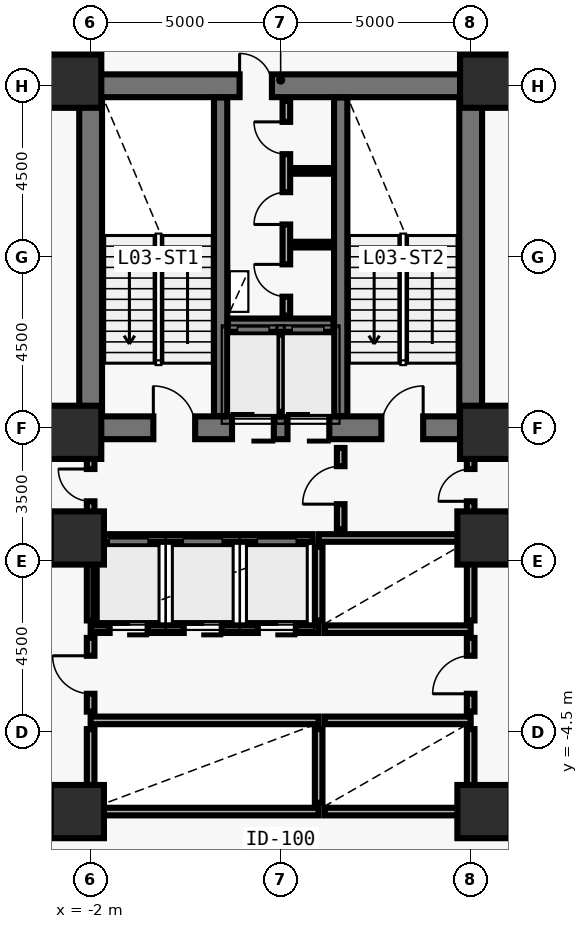
"""IFC4 building model, lengths in metres.
Left out: names, types, materials, properties, quantities, classifications, styles, units other than length and angle.
Written with IfcOpenShell. Run it as: python <this file> out.ifc"""

import sys

from ifc_helpers import new_model, si_unit, direction, frame, frame_2d, origin, origin_2d, place, context, subcontext, project, spatial, rectangle, extrude, element, fill, save


model = new_model("IFC4")
c1 = context("Model", 3, precision=1e-05, world=origin(), true_north=direction((0.0, 1.0)))
c2 = subcontext(c1, "Body", "Model", "MODEL_VIEW")
j1 = project(units=[si_unit("LENGTHUNIT", "METRE"), si_unit("PLANEANGLEUNIT", "RADIAN")], contexts=[c1])
p1 = place(None, origin())
s1 = spatial("IfcSite", under=j1, at=p1, CompositionType="ELEMENT")
p2 = place(p1, origin())
s2 = spatial("IfcBuilding", under=s1, at=p2, CompositionType="ELEMENT")
p3 = place(p2, frame((0.0, 0.0, 13.8)))
s3 = spatial("IfcBuildingStorey", under=s2, at=p3, CompositionType="ELEMENT", Elevation=13.8)
p4 = place(p3, frame((-2.0, 3.5, 0.0), z_axis=(0.0, 0.0, 1.0), x_axis=(1.0, 0.0, 0.0)))
e1 = element("IfcWall", 1, at=p4, inside=s3, PredefinedType="SHEAR", context=c2, shape_type="SweptSolid", body=[
    extrude(rectangle(XDim=10.0, YDim=0.6, at=frame_2d((5.0, 0.0))), origin(), (0.0, 0.0, 1.0), 4.592),
])
p5 = place(p4, frame((1.65, 0.0, 0.0)))
e2 = element("IfcOpeningElement", 2, at=p5, cuts=e1, PredefinedType="OPENING", context=c2, shape_type="SweptSolid", body=[
    extrude(rectangle(XDim=1.1, YDim=2.15, at=frame_2d((0.55, 1.075))), frame((0.0, 0.31, 0.0), z_axis=(0.0, -1.0, 0.0), x_axis=(1.0, 0.0, 0.0)), (0.0, 0.0, 1.0), 0.62),
])
p6 = place(p4, frame((7.65, 0.0, 0.0)))
e3 = element("IfcOpeningElement", 3, at=p6, cuts=e1, PredefinedType="OPENING", context=c2, shape_type="SweptSolid", body=[
    extrude(rectangle(XDim=1.1, YDim=2.15, at=frame_2d((0.55, 1.075))), frame((0.0, 0.31, 0.0), z_axis=(0.0, -1.0, 0.0), x_axis=(1.0, 0.0, 0.0)), (0.0, 0.0, 1.0), 0.62),
])
p7 = place(p4, frame((3.72, 0.0, 0.0)))
e4 = element("IfcOpeningElement", 4, at=p7, cuts=e1, PredefinedType="OPENING", context=c2, shape_type="SweptSolid", body=[
    extrude(rectangle(XDim=1.1, YDim=2.2, at=frame_2d((0.55, 1.1))), frame((0.0, 0.31, 0.0), z_axis=(0.0, -1.0, 0.0), x_axis=(1.0, 0.0, 0.0)), (0.0, 0.0, 1.0), 0.62),
])
p8 = place(p4, frame((5.18, 0.0, 0.0)))
e5 = element("IfcOpeningElement", 5, at=p8, cuts=e1, PredefinedType="OPENING", context=c2, shape_type="SweptSolid", body=[
    extrude(rectangle(XDim=1.1, YDim=2.2, at=frame_2d((0.55, 1.1))), frame((0.0, 0.31, 0.0), z_axis=(0.0, -1.0, 0.0), x_axis=(1.0, 0.0, 0.0)), (0.0, 0.0, 1.0), 0.62),
])
p9 = place(p3, frame((-2.0, 12.5, 0.0), z_axis=(0.0, 0.0, 1.0), x_axis=(1.0, 0.0, 0.0)))
e6 = element("IfcWall", 6, at=p9, inside=s3, PredefinedType="SHEAR", context=c2, shape_type="SweptSolid", body=[
    extrude(rectangle(XDim=10.0, YDim=0.6, at=frame_2d((5.0, 0.0))), origin(), (0.0, 0.0, 1.0), 4.592),
])
p10 = place(p9, frame((3.92, 0.0, 0.0)))
e7 = element("IfcOpeningElement", 7, at=p10, cuts=e6, PredefinedType="OPENING", context=c2, shape_type="SweptSolid", body=[
    extrude(rectangle(XDim=0.85, YDim=2.1, at=frame_2d((0.425, 1.05))), frame((0.0, 0.31, 0.0), z_axis=(0.0, -1.0, 0.0), x_axis=(1.0, 0.0, 0.0)), (0.0, 0.0, 1.0), 0.62),
])
for number, where, z_axis, x_axis in (
    (8, (-2.0, 3.81, 0.0), (0.0, 0.0, 1.0), (0.0, 1.0, 0.0)),
    (9, (8.0, 3.81, 0.0), (0.0, 0.0, 1.0), (0.0, 1.0, 0.0)),
):
    element("IfcWall", number, at=place(p3, frame(where, z_axis=z_axis, x_axis=x_axis)), inside=s3, PredefinedType="SHEAR", context=c2, shape_type="SweptSolid", body=[
        extrude(rectangle(XDim=8.38, YDim=0.6, at=frame_2d((4.19, 0.0))), origin(), (0.0, 0.0, 1.0), 4.592),
    ])
for number, where, z_axis, x_axis in (
    (10, (1.42, 3.81, 0.0), (0.0, 0.0, 1.0), (0.0, 1.0, 0.0)),
    (11, (4.58, 3.81, 0.0), (0.0, 0.0, 1.0), (0.0, 1.0, 0.0)),
):
    element("IfcWall", number, at=place(p3, frame(where, z_axis=z_axis, x_axis=x_axis)), inside=s3, PredefinedType="SHEAR", context=c2, shape_type="SweptSolid", body=[
        extrude(rectangle(XDim=8.38, YDim=0.35, at=frame_2d((4.19, 0.0))), origin(), (0.0, 0.0, 1.0), 4.592),
    ])
p11 = place(p3, frame((1.61, 6.2, 0.0), z_axis=(0.0, 0.0, 1.0), x_axis=(1.0, 0.0, 0.0)))
e12 = element("IfcWall", 12, at=p11, inside=s3, PredefinedType="SHEAR", context=c2, shape_type="SweptSolid", body=[
    extrude(rectangle(XDim=2.78, YDim=0.35, at=frame_2d((1.39, 0.0))), origin(), (0.0, 0.0, 1.0), 4.592),
])
for number, where, z_axis, x_axis in (
    (13, (-2.42, 12.62, 0.0), (0.0, 0.0, 1.0), (1.0, 0.0, 0.0)),
    (14, (8.42, 12.62, 0.0), (0.0, 0.0, 1.0), (1.0, 0.0, 0.0)),
    (15, (-2.42, 3.38, 0.0), (0.0, 0.0, 1.0), (1.0, 0.0, 0.0)),
    (16, (8.42, 3.38, 0.0), (0.0, 0.0, 1.0), (1.0, 0.0, 0.0)),
    (17, (-2.35, 0.6, 0.0), (0.0, 0.0, 1.0), (1.0, 0.0, 0.0)),
    (18, (8.35, 0.6, 0.0), (0.0, 0.0, 1.0), (1.0, 0.0, 0.0)),
    (19, (-2.35, -6.6, 0.0), (0.0, 0.0, 1.0), (1.0, 0.0, 0.0)),
    (20, (8.35, -6.6, 0.0), (0.0, 0.0, 1.0), (1.0, 0.0, 0.0)),
):
    element("IfcColumn", number, at=place(p3, frame(where, z_axis=z_axis, x_axis=x_axis)), inside=s3, PredefinedType="COLUMN", context=c2, shape_type="SweptSolid", body=[
        extrude(rectangle(XDim=1.4, YDim=1.4, at=origin_2d()), origin(), (0.0, 0.0, 1.0), 4.575),
    ])
p12 = place(p3, frame((3.0, 3.92, 0.0), z_axis=(0.0, 0.0, 1.0), x_axis=(0.0, 1.0, 0.0)))
e21 = element("IfcWall", 21, at=p12, inside=s3, PredefinedType="SOLIDWALL", context=c2, shape_type="SweptSolid", body=[
    extrude(rectangle(XDim=2.03, YDim=0.2, at=frame_2d((1.015, 0.0))), origin(), (0.0, 0.0, 1.0), 4.28),
])
p13 = place(p3, frame((4.0, 0.6, 0.0), z_axis=(0.0, 0.0, 1.0), x_axis=(1.0, 0.0, 0.0)))
e22 = element("IfcWall", 22, at=p13, inside=s3, PredefinedType="SOLIDWALL", context=c2, shape_type="SweptSolid", body=[
    extrude(rectangle(XDim=3.88, YDim=0.2, at=frame_2d((1.94, 0.0))), origin(), (0.0, 0.0, 1.0), 3.362),
])
p14 = place(p3, frame((-2.0, -1.8, 0.0), z_axis=(0.0, 0.0, 1.0), x_axis=(1.0, 0.0, 0.0)))
e23 = element("IfcWall", 23, at=p14, inside=s3, PredefinedType="SOLIDWALL", context=c2, shape_type="SweptSolid", body=[
    extrude(rectangle(XDim=6.0, YDim=0.2, at=frame_2d((3.0, 0.0))), origin(), (0.0, 0.0, 1.0), 4.28),
])
p15 = place(p14, frame((0.5, 0.0, 0.0)))
e24 = element("IfcOpeningElement", 24, at=p15, cuts=e23, PredefinedType="OPENING", context=c2, shape_type="SweptSolid", body=[
    extrude(rectangle(XDim=1.0, YDim=2.2, at=frame_2d((0.5, 1.1))), frame((0.0, 0.11, 0.0), z_axis=(0.0, -1.0, 0.0), x_axis=(1.0, 0.0, 0.0)), (0.0, 0.0, 1.0), 0.22),
])
p16 = place(p14, frame((2.45, 0.0, 0.0)))
e25 = element("IfcOpeningElement", 25, at=p16, cuts=e23, PredefinedType="OPENING", context=c2, shape_type="SweptSolid", body=[
    extrude(rectangle(XDim=1.0, YDim=2.2, at=frame_2d((0.5, 1.1))), frame((0.0, 0.11, 0.0), z_axis=(0.0, -1.0, 0.0), x_axis=(1.0, 0.0, 0.0)), (0.0, 0.0, 1.0), 0.22),
])
p17 = place(p14, frame((4.4, 0.0, 0.0)))
e26 = element("IfcOpeningElement", 26, at=p17, cuts=e23, PredefinedType="OPENING", context=c2, shape_type="SweptSolid", body=[
    extrude(rectangle(XDim=1.0, YDim=2.2, at=frame_2d((0.5, 1.1))), frame((0.0, 0.11, 0.0), z_axis=(0.0, -1.0, 0.0), x_axis=(1.0, 0.0, 0.0)), (0.0, 0.0, 1.0), 0.22),
])
p18 = place(p3, frame((-2.0, -1.57, 0.0), z_axis=(0.0, 0.0, 1.0), x_axis=(0.0, 1.0, 0.0)))
e27 = element("IfcWall", 27, at=p18, inside=s3, PredefinedType="SOLIDWALL", context=c2, shape_type="SweptSolid", body=[
    extrude(rectangle(XDim=2.05, YDim=0.2, at=frame_2d((1.025, 0.0))), origin(), (0.0, 0.0, 1.0), 3.362),
])
p19 = place(p3, frame((4.16, -1.8, 0.0), z_axis=(0.0, 0.0, 1.0), x_axis=(1.0, 0.0, 0.0)))
e28 = element("IfcWall", 28, at=p19, inside=s3, PredefinedType="SOLIDWALL", context=c2, shape_type="SweptSolid", body=[
    extrude(rectangle(XDim=3.84, YDim=0.2, at=frame_2d((1.92, 0.0))), origin(), (0.0, 0.0, 1.0), 4.28),
])
p20 = place(p3, frame((4.0, -1.57, 0.0), z_axis=(0.0, 0.0, 1.0), x_axis=(0.0, 1.0, 0.0)))
e29 = element("IfcWall", 29, at=p20, inside=s3, PredefinedType="SOLIDWALL", context=c2, shape_type="SweptSolid", body=[
    extrude(rectangle(XDim=1.94, YDim=0.2, at=frame_2d((0.97, 0.0))), origin(), (0.0, 0.0, 1.0), 4.28),
])
p21 = place(p3, frame((8.0, -1.57, 0.0), z_axis=(0.0, 0.0, 1.0), x_axis=(0.0, 1.0, 0.0)))
e30 = element("IfcWall", 30, at=p21, inside=s3, PredefinedType="SOLIDWALL", context=c2, shape_type="SweptSolid", body=[
    extrude(rectangle(XDim=2.05, YDim=0.2, at=frame_2d((1.025, 0.0))), origin(), (0.0, 0.0, 1.0), 3.362),
])
p22 = place(p3, frame((-2.0, -4.2, 0.0), z_axis=(0.0, 0.0, 1.0), x_axis=(1.0, 0.0, 0.0)))
e31 = element("IfcWall", 31, at=p22, inside=s3, PredefinedType="SOLIDWALL", context=c2, shape_type="SweptSolid", body=[
    extrude(rectangle(XDim=6.0, YDim=0.2, at=frame_2d((3.0, 0.0))), origin(), (0.0, 0.0, 1.0), 4.28),
])
p23 = place(p3, frame((-2.0, -6.6, 0.0), z_axis=(0.0, 0.0, 1.0), x_axis=(1.0, 0.0, 0.0)))
e32 = element("IfcWall", 32, at=p23, inside=s3, PredefinedType="SOLIDWALL", context=c2, shape_type="SweptSolid", body=[
    extrude(rectangle(XDim=6.0, YDim=0.2, at=frame_2d((3.0, 0.0))), origin(), (0.0, 0.0, 1.0), 3.362),
])
p24 = place(p3, frame((-2.0, -6.37, 0.0), z_axis=(0.0, 0.0, 1.0), x_axis=(0.0, 1.0, 0.0)))
e33 = element("IfcWall", 33, at=p24, inside=s3, PredefinedType="SOLIDWALL", context=c2, shape_type="SweptSolid", body=[
    extrude(rectangle(XDim=1.94, YDim=0.2, at=frame_2d((0.97, 0.0))), origin(), (0.0, 0.0, 1.0), 3.362),
])
p25 = place(p3, frame((4.16, -4.2, 0.0), z_axis=(0.0, 0.0, 1.0), x_axis=(1.0, 0.0, 0.0)))
e34 = element("IfcWall", 34, at=p25, inside=s3, PredefinedType="SOLIDWALL", context=c2, shape_type="SweptSolid", body=[
    extrude(rectangle(XDim=3.84, YDim=0.2, at=frame_2d((1.92, 0.0))), origin(), (0.0, 0.0, 1.0), 4.28),
])
p26 = place(p3, frame((4.16, -6.6, 0.0), z_axis=(0.0, 0.0, 1.0), x_axis=(1.0, 0.0, 0.0)))
e35 = element("IfcWall", 35, at=p26, inside=s3, PredefinedType="SOLIDWALL", context=c2, shape_type="SweptSolid", body=[
    extrude(rectangle(XDim=3.84, YDim=0.2, at=frame_2d((1.92, 0.0))), origin(), (0.0, 0.0, 1.0), 3.362),
])
p27 = place(p3, frame((4.0, -6.37, 0.0), z_axis=(0.0, 0.0, 1.0), x_axis=(0.0, 1.0, 0.0)))
e36 = element("IfcWall", 36, at=p27, inside=s3, PredefinedType="SOLIDWALL", context=c2, shape_type="SweptSolid", body=[
    extrude(rectangle(XDim=1.94, YDim=0.2, at=frame_2d((0.97, 0.0))), origin(), (0.0, 0.0, 1.0), 4.28),
])
p28 = place(p3, frame((8.0, -6.37, 0.0), z_axis=(0.0, 0.0, 1.0), x_axis=(0.0, 1.0, 0.0)))
e37 = element("IfcWall", 37, at=p28, inside=s3, PredefinedType="SOLIDWALL", context=c2, shape_type="SweptSolid", body=[
    extrude(rectangle(XDim=1.94, YDim=0.2, at=frame_2d((0.97, 0.0))), origin(), (0.0, 0.0, 1.0), 3.362),
])
p29 = place(p3, frame((3.15, 6.45, 0.0), z_axis=(0.0, 0.0, 1.0), x_axis=(0.0, 1.0, 0.0)))
e38 = element("IfcWall", 38, at=p29, inside=s3, PredefinedType="MOVABLE", context=c2, shape_type="SweptSolid", body=[
    extrude(rectangle(XDim=5.65, YDim=0.2, at=frame_2d((2.825, 0.0))), origin(), (0.0, 0.0, 1.0), 4.28),
])
p30 = place(p29, frame((0.5, 0.0, 0.0)))
e39 = element("IfcOpeningElement", 39, at=p30, cuts=e38, PredefinedType="OPENING", context=c2, shape_type="SweptSolid", body=[
    extrude(rectangle(XDim=0.85, YDim=2.1, at=frame_2d((0.425, 1.05))), frame((0.0, 0.11, 0.0), z_axis=(0.0, -1.0, 0.0), x_axis=(1.0, 0.0, 0.0)), (0.0, 0.0, 1.0), 0.22),
])
p31 = place(p29, frame((2.4, 0.0, 0.0)))
e40 = element("IfcOpeningElement", 40, at=p31, cuts=e38, PredefinedType="OPENING", context=c2, shape_type="SweptSolid", body=[
    extrude(rectangle(XDim=0.85, YDim=2.1, at=frame_2d((0.425, 1.05))), frame((0.0, 0.11, 0.0), z_axis=(0.0, -1.0, 0.0), x_axis=(1.0, 0.0, 0.0)), (0.0, 0.0, 1.0), 0.22),
])
p32 = place(p29, frame((4.25, 0.0, 0.0)))
e41 = element("IfcOpeningElement", 41, at=p32, cuts=e38, PredefinedType="OPENING", context=c2, shape_type="SweptSolid", body=[
    extrude(rectangle(XDim=0.85, YDim=2.1, at=frame_2d((0.425, 1.05))), frame((0.0, 0.11, 0.0), z_axis=(0.0, -1.0, 0.0), x_axis=(1.0, 0.0, 0.0)), (0.0, 0.0, 1.0), 0.22),
])
p33 = place(p3, frame((4.58, 0.83, 0.0), z_axis=(0.0, 0.0, 1.0), x_axis=(0.0, 1.0, 0.0)))
e42 = element("IfcWall", 42, at=p33, inside=s3, PredefinedType="MOVABLE", context=c2, shape_type="SweptSolid", body=[
    extrude(rectangle(XDim=2.14, YDim=0.2, at=frame_2d((1.07, 0.0))), origin(), (0.0, 0.0, 1.0), 4.28),
])
p34 = place(p33, frame((0.66, 0.0, 0.0)))
e43 = element("IfcOpeningElement", 43, at=p34, cuts=e42, PredefinedType="OPENING", context=c2, shape_type="SweptSolid", body=[
    extrude(rectangle(XDim=1.0, YDim=2.1, at=frame_2d((0.5, 1.05))), frame((0.0, 0.11, 0.0), z_axis=(0.0, -1.0, 0.0), x_axis=(1.0, 0.0, 0.0)), (0.0, 0.0, 1.0), 0.22),
])
p35 = place(p3, frame((-2.0, 0.72, 0.0), z_axis=(0.0, 0.0, 1.0), x_axis=(0.0, 1.0, 0.0)))
e44 = element("IfcWall", 44, at=p35, inside=s3, PredefinedType="MOVABLE", context=c2, shape_type="SweptSolid", body=[
    extrude(rectangle(XDim=2.25, YDim=0.2, at=frame_2d((1.125, 0.0))), origin(), (0.0, 0.0, 1.0), 3.512),
])
p36 = place(p35, frame((0.845, 0.0, 0.0)))
e45 = element("IfcOpeningElement", 45, at=p36, cuts=e44, PredefinedType="OPENING", context=c2, shape_type="SweptSolid", body=[
    extrude(rectangle(XDim=0.85, YDim=2.1, at=frame_2d((0.425, 1.05))), frame((0.0, 0.11, 0.0), z_axis=(0.0, -1.0, 0.0), x_axis=(1.0, 0.0, 0.0)), (0.0, 0.0, 1.0), 0.22),
])
p37 = place(p3, frame((8.0, 0.72, 0.0), z_axis=(0.0, 0.0, 1.0), x_axis=(0.0, 1.0, 0.0)))
e46 = element("IfcWall", 46, at=p37, inside=s3, PredefinedType="MOVABLE", context=c2, shape_type="SweptSolid", body=[
    extrude(rectangle(XDim=2.25, YDim=0.2, at=frame_2d((1.125, 0.0))), origin(), (0.0, 0.0, 1.0), 3.512),
])
p38 = place(p37, frame((0.845, 0.0, 0.0)))
e47 = element("IfcOpeningElement", 47, at=p38, cuts=e46, PredefinedType="OPENING", context=c2, shape_type="SweptSolid", body=[
    extrude(rectangle(XDim=0.85, YDim=2.1, at=frame_2d((0.425, 1.05))), frame((0.0, 0.11, 0.0), z_axis=(0.0, -1.0, 0.0), x_axis=(1.0, 0.0, 0.0)), (0.0, 0.0, 1.0), 0.22),
])
p39 = place(p3, frame((-2.0, -3.97, 0.0), z_axis=(0.0, 0.0, 1.0), x_axis=(0.0, 1.0, 0.0)))
e48 = element("IfcWall", 48, at=p39, inside=s3, PredefinedType="MOVABLE", context=c2, shape_type="SweptSolid", body=[
    extrude(rectangle(XDim=1.94, YDim=0.2, at=frame_2d((0.97, 0.0))), origin(), (0.0, 0.0, 1.0), 3.362),
])
p40 = place(p39, frame((0.47, 0.0, 0.0)))
e49 = element("IfcOpeningElement", 49, at=p40, cuts=e48, PredefinedType="OPENING", context=c2, shape_type="SweptSolid", body=[
    extrude(rectangle(XDim=1.0, YDim=2.1, at=frame_2d((0.5, 1.05))), frame((0.0, 0.11, 0.0), z_axis=(0.0, -1.0, 0.0), x_axis=(1.0, 0.0, 0.0)), (0.0, 0.0, 1.0), 0.22),
])
p41 = place(p3, frame((8.0, -3.97, 0.0), z_axis=(0.0, 0.0, 1.0), x_axis=(0.0, 1.0, 0.0)))
e50 = element("IfcWall", 50, at=p41, inside=s3, PredefinedType="MOVABLE", context=c2, shape_type="SweptSolid", body=[
    extrude(rectangle(XDim=1.94, YDim=0.2, at=frame_2d((0.97, 0.0))), origin(), (0.0, 0.0, 1.0), 3.362),
])
p42 = place(p41, frame((0.47, 0.0, 0.0)))
e51 = element("IfcOpeningElement", 51, at=p42, cuts=e50, PredefinedType="OPENING", context=c2, shape_type="SweptSolid", body=[
    extrude(rectangle(XDim=1.0, YDim=2.1, at=frame_2d((0.5, 1.05))), frame((0.0, 0.11, 0.0), z_axis=(0.0, -1.0, 0.0), x_axis=(1.0, 0.0, 0.0)), (0.0, 0.0, 1.0), 0.22),
])
for number, where, z_axis, x_axis in (
    (52, (3.37, 8.32, 0.0), (0.0, 0.0, 1.0), (1.0, 0.0, 0.0)),
    (53, (3.37, 10.26, 0.0), (0.0, 0.0, 1.0), (1.0, 0.0, 0.0)),
):
    element("IfcWall", number, at=place(p3, frame(where, z_axis=z_axis, x_axis=x_axis)), inside=s3, PredefinedType="PARTITIONING", context=c2, shape_type="SweptSolid", body=[
        extrude(rectangle(XDim=0.98, YDim=0.15, at=frame_2d((0.49, 0.0))), origin(), (0.0, 0.0, 1.0), 4.28),
    ])
p43 = place(p3, frame((-1.88, 0.6, 0.0), z_axis=(0.0, 0.0, 1.0), x_axis=(1.0, 0.0, 0.0)))
e54 = element("IfcWall", 54, at=p43, inside=s3, PredefinedType="MOVABLE", context=c2, shape_type="SweptSolid", body=[
    extrude(rectangle(XDim=5.72, YDim=0.2, at=frame_2d((2.86, 0.0))), origin(), (0.0, 0.0, 1.0), 3.362),
])
p44 = place(p5, origin())
e55 = element("IfcDoor", 55, at=p44, inside=s3, OperationType="SINGLE_SWING_LEFT", PredefinedType="DOOR", context=c2, shape_type="SweptSolid", body=[
    extrude(rectangle(XDim=1.1, YDim=2.15, at=frame_2d((0.55, 1.075))), frame((0.0, 0.025, 0.0), z_axis=(0.0, -1.0, 0.0), x_axis=(1.0, 0.0, 0.0)), (0.0, 0.0, 1.0), 0.05),
])
fill(e2, e55)
p45 = place(p6, origin())
e56 = element("IfcDoor", 56, at=p45, inside=s3, OperationType="SINGLE_SWING_RIGHT", PredefinedType="DOOR", context=c2, shape_type="SweptSolid", body=[
    extrude(rectangle(XDim=1.1, YDim=2.15, at=frame_2d((0.55, 1.075))), frame((0.0, 0.025, 0.0), z_axis=(0.0, -1.0, 0.0), x_axis=(1.0, 0.0, 0.0)), (0.0, 0.0, 1.0), 0.05),
])
fill(e3, e56)
p46 = place(p7, origin())
e57 = element("IfcDoor", 57, at=p46, inside=s3, OperationType="DOUBLE_DOOR_SLIDING", PredefinedType="DOOR", context=c2, shape_type="SweptSolid", body=[
    extrude(rectangle(XDim=1.1, YDim=2.2, at=frame_2d((0.55, 1.1))), frame((0.0, 0.025, 0.0), z_axis=(0.0, -1.0, 0.0), x_axis=(1.0, 0.0, 0.0)), (0.0, 0.0, 1.0), 0.05),
])
fill(e4, e57)
p47 = place(p8, origin())
e58 = element("IfcDoor", 58, at=p47, inside=s3, OperationType="DOUBLE_DOOR_SLIDING", PredefinedType="DOOR", context=c2, shape_type="SweptSolid", body=[
    extrude(rectangle(XDim=1.1, YDim=2.2, at=frame_2d((0.55, 1.1))), frame((0.0, 0.025, 0.0), z_axis=(0.0, -1.0, 0.0), x_axis=(1.0, 0.0, 0.0)), (0.0, 0.0, 1.0), 0.05),
])
fill(e5, e58)
p48 = place(p10, origin())
e59 = element("IfcDoor", 59, at=p48, inside=s3, OperationType="SINGLE_SWING_LEFT", PredefinedType="DOOR", context=c2, shape_type="SweptSolid", body=[
    extrude(rectangle(XDim=0.85, YDim=2.1, at=frame_2d((0.425, 1.05))), frame((0.0, 0.025, 0.0), z_axis=(0.0, -1.0, 0.0), x_axis=(1.0, 0.0, 0.0)), (0.0, 0.0, 1.0), 0.05),
])
fill(e7, e59)
p49 = place(p30, origin())
e60 = element("IfcDoor", 60, at=p49, inside=s3, OperationType="SINGLE_SWING_RIGHT", PredefinedType="DOOR", context=c2, shape_type="SweptSolid", body=[
    extrude(rectangle(XDim=0.85, YDim=2.1, at=frame_2d((0.425, 1.05))), frame((0.0, 0.025, 0.0), z_axis=(0.0, -1.0, 0.0), x_axis=(1.0, 0.0, 0.0)), (0.0, 0.0, 1.0), 0.05),
])
fill(e39, e60)
p50 = place(p31, origin())
e61 = element("IfcDoor", 61, at=p50, inside=s3, OperationType="SINGLE_SWING_LEFT", PredefinedType="DOOR", context=c2, shape_type="SweptSolid", body=[
    extrude(rectangle(XDim=0.85, YDim=2.1, at=frame_2d((0.425, 1.05))), frame((0.0, 0.025, 0.0), z_axis=(0.0, -1.0, 0.0), x_axis=(1.0, 0.0, 0.0)), (0.0, 0.0, 1.0), 0.05),
])
fill(e40, e61)
p51 = place(p32, origin())
e62 = element("IfcDoor", 62, at=p51, inside=s3, OperationType="SINGLE_SWING_RIGHT", PredefinedType="DOOR", context=c2, shape_type="SweptSolid", body=[
    extrude(rectangle(XDim=0.85, YDim=2.1, at=frame_2d((0.425, 1.05))), frame((0.0, 0.025, 0.0), z_axis=(0.0, -1.0, 0.0), x_axis=(1.0, 0.0, 0.0)), (0.0, 0.0, 1.0), 0.05),
])
fill(e41, e62)
p52 = place(p34, origin())
e63 = element("IfcDoor", 63, at=p52, inside=s3, OperationType="SINGLE_SWING_LEFT", PredefinedType="DOOR", context=c2, shape_type="SweptSolid", body=[
    extrude(rectangle(XDim=1.0, YDim=2.1, at=frame_2d((0.5, 1.05))), frame((0.0, 0.025, 0.0), z_axis=(0.0, -1.0, 0.0), x_axis=(1.0, 0.0, 0.0)), (0.0, 0.0, 1.0), 0.05),
])
fill(e43, e63)
p53 = place(p36, origin())
e64 = element("IfcDoor", 64, at=p53, inside=s3, OperationType="SINGLE_SWING_RIGHT", PredefinedType="DOOR", context=c2, shape_type="SweptSolid", body=[
    extrude(rectangle(XDim=0.85, YDim=2.1, at=frame_2d((0.425, 1.05))), frame((0.0, 0.025, 0.0), z_axis=(0.0, -1.0, 0.0), x_axis=(1.0, 0.0, 0.0)), (0.0, 0.0, 1.0), 0.05),
])
fill(e45, e64)
p54 = place(p38, origin())
e65 = element("IfcDoor", 65, at=p54, inside=s3, OperationType="SINGLE_SWING_LEFT", PredefinedType="DOOR", context=c2, shape_type="SweptSolid", body=[
    extrude(rectangle(XDim=0.85, YDim=2.1, at=frame_2d((0.425, 1.05))), frame((0.0, 0.025, 0.0), z_axis=(0.0, -1.0, 0.0), x_axis=(1.0, 0.0, 0.0)), (0.0, 0.0, 1.0), 0.05),
])
fill(e47, e65)
p55 = place(p40, origin())
e66 = element("IfcDoor", 66, at=p55, inside=s3, OperationType="SINGLE_SWING_RIGHT", PredefinedType="DOOR", context=c2, shape_type="SweptSolid", body=[
    extrude(rectangle(XDim=1.0, YDim=2.1, at=frame_2d((0.5, 1.05))), frame((0.0, 0.025, 0.0), z_axis=(0.0, -1.0, 0.0), x_axis=(1.0, 0.0, 0.0)), (0.0, 0.0, 1.0), 0.05),
])
fill(e49, e66)
p56 = place(p42, origin())
e67 = element("IfcDoor", 67, at=p56, inside=s3, OperationType="SINGLE_SWING_LEFT", PredefinedType="DOOR", context=c2, shape_type="SweptSolid", body=[
    extrude(rectangle(XDim=1.0, YDim=2.1, at=frame_2d((0.5, 1.05))), frame((0.0, 0.025, 0.0), z_axis=(0.0, -1.0, 0.0), x_axis=(1.0, 0.0, 0.0)), (0.0, 0.0, 1.0), 0.05),
])
fill(e51, e67)
p57 = place(p15, origin())
e68 = element("IfcDoor", 68, at=p57, inside=s3, OperationType="DOUBLE_DOOR_SLIDING", PredefinedType="DOOR", context=c2, shape_type="SweptSolid", body=[
    extrude(rectangle(XDim=1.0, YDim=2.2, at=frame_2d((0.5, 1.1))), frame((0.0, 0.025, 0.0), z_axis=(0.0, -1.0, 0.0), x_axis=(1.0, 0.0, 0.0)), (0.0, 0.0, 1.0), 0.05),
])
fill(e24, e68)
p58 = place(p16, origin())
e69 = element("IfcDoor", 69, at=p58, inside=s3, OperationType="DOUBLE_DOOR_SLIDING", PredefinedType="DOOR", context=c2, shape_type="SweptSolid", body=[
    extrude(rectangle(XDim=1.0, YDim=2.2, at=frame_2d((0.5, 1.1))), frame((0.0, 0.025, 0.0), z_axis=(0.0, -1.0, 0.0), x_axis=(1.0, 0.0, 0.0)), (0.0, 0.0, 1.0), 0.05),
])
fill(e25, e69)
p59 = place(p17, origin())
e70 = element("IfcDoor", 70, at=p59, inside=s3, OperationType="DOUBLE_DOOR_SLIDING", PredefinedType="DOOR", context=c2, shape_type="SweptSolid", body=[
    extrude(rectangle(XDim=1.0, YDim=2.2, at=frame_2d((0.5, 1.1))), frame((0.0, 0.025, 0.0), z_axis=(0.0, -1.0, 0.0), x_axis=(1.0, 0.0, 0.0)), (0.0, 0.0, 1.0), 0.05),
])
fill(e26, e70)
save(model, sys.argv[1])
